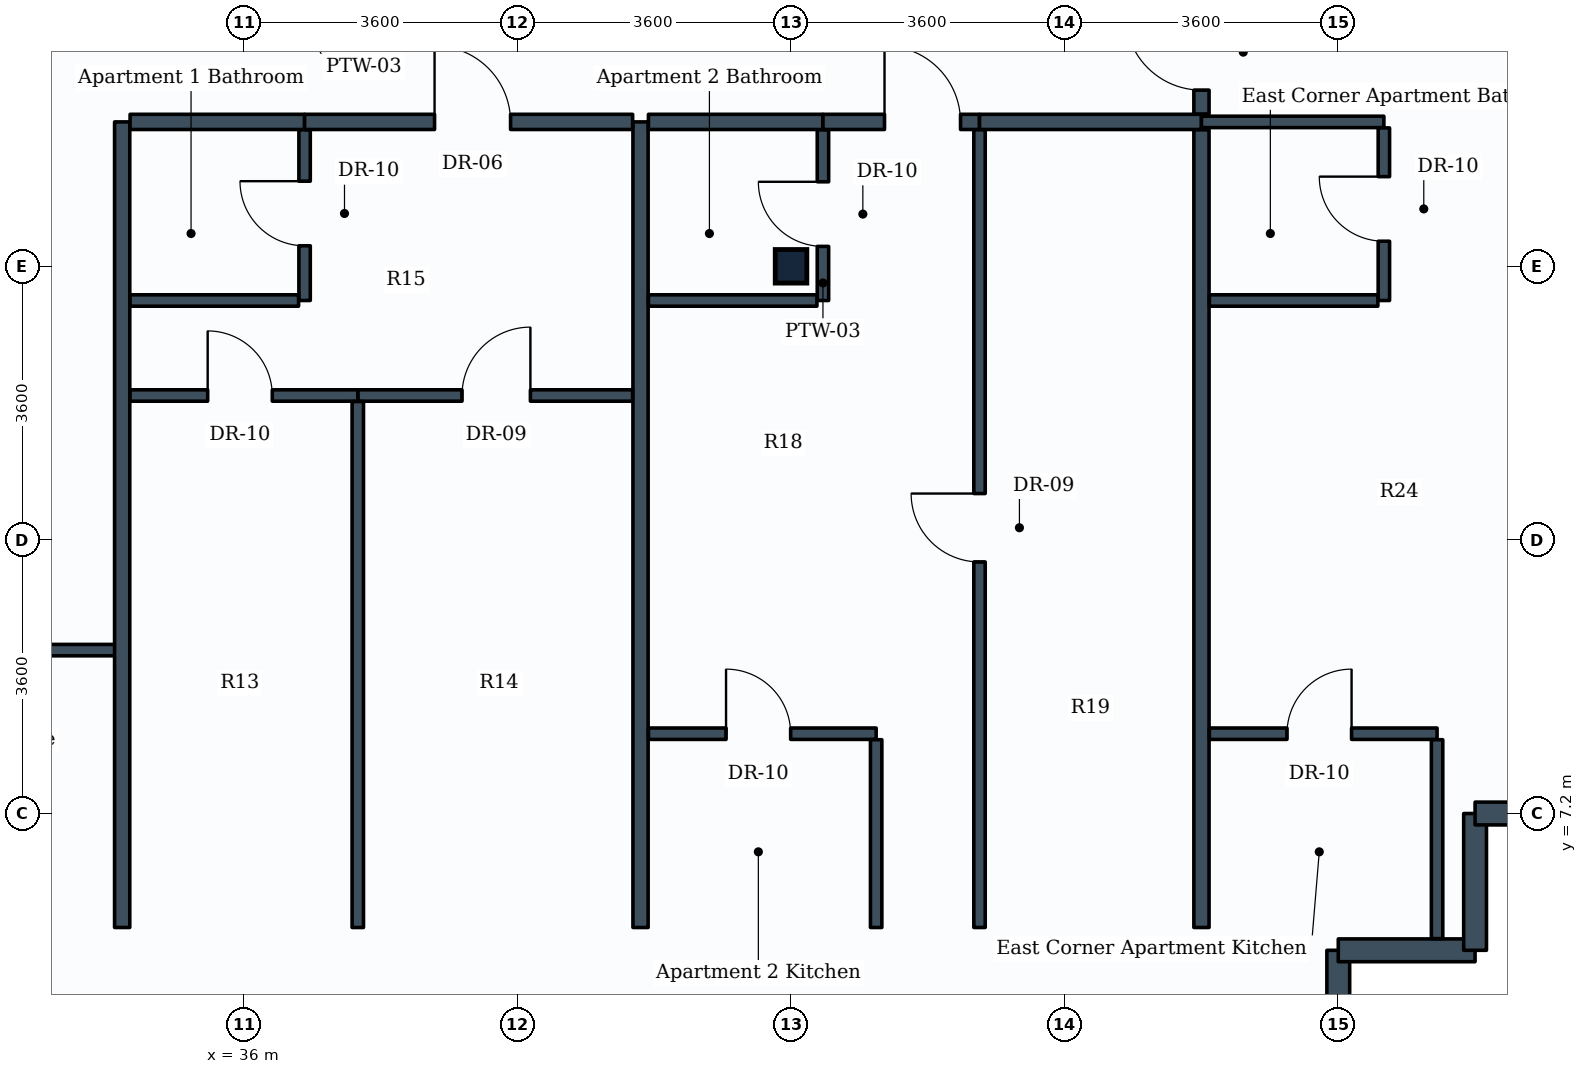
"""IFC4 building model, lengths in metres.
Left out: names, types, materials, properties, quantities, classifications, styles, units other than length and angle.
Written with IfcOpenShell. Run it as: python <this file> out.ifc"""

import sys

from ifc_helpers import new_model, si_unit, direction, frame, frame_2d, origin, origin_2d, place, context, subcontext, project, spatial, rectangle, i_section, extrude, element, fill, save


model = new_model("IFC4")
c1 = context("Model", 3, precision=1e-05, world=origin(), true_north=direction((0.0, 1.0)))
c2 = subcontext(c1, "Body", "Model", "MODEL_VIEW")
j1 = project(units=[si_unit("LENGTHUNIT", "METRE"), si_unit("PLANEANGLEUNIT", "RADIAN")], contexts=[c1])
p1 = place(None, origin())
s1 = spatial("IfcSite", under=j1, at=p1, CompositionType="ELEMENT")
p2 = place(p1, origin())
s2 = spatial("IfcBuilding", under=s1, at=p2, CompositionType="ELEMENT")
p3 = place(p2, frame((0.0, 0.0, 135.2)))
s3 = spatial("IfcBuildingStorey", under=s2, at=p3, CompositionType="ELEMENT", Elevation=135.2)
p4 = place(p3, frame((43.2, 14.4, 0.0), z_axis=(0.0, 0.0, 1.0), x_axis=(1.0, 0.0, 0.0)))
e1 = element("IfcColumn", 1, at=p4, inside=s3, PredefinedType="COLUMN", context=c2, shape_type="SweptSolid", body=[
    extrude(i_section(OverallWidth=0.416, OverallDepth=0.442, WebThickness=0.025, FlangeThickness=0.041, FilletRadius=0.015, at=origin_2d()), origin(), (0.0, 0.0, 1.0), 3.8),
])
p5 = place(p3, frame((50.4, 5.4, 0.0), z_axis=(0.0, 0.0, 1.0), x_axis=(0.0, -1.0, 0.0)))
e2 = element("IfcWall", 2, at=p5, inside=s3, PredefinedType="STANDARD", context=c2, shape_type="SweptSolid", body=[
    extrude(rectangle(XDim=1.8, YDim=0.3, at=frame_2d((0.9, 0.0))), origin(), (0.0, 0.0, 1.0), 2.93),
])
for number, where, z_axis, x_axis in (
    (3, (52.2, 5.4, 0.0), (0.0, 0.0, 1.0), (-1.0, 0.0, 0.0)),
    (4, (52.2, 7.2, 0.0), (0.0, 0.0, 1.0), (0.0, -1.0, 0.0)),
):
    element("IfcWall", number, at=place(p3, frame(where, z_axis=z_axis, x_axis=x_axis)), inside=s3, PredefinedType="STANDARD", context=c2, shape_type="SweptSolid", body=[
        extrude(rectangle(XDim=1.8, YDim=0.3, at=frame_2d((0.9, 0.0))), origin(), (0.0, 0.0, 1.0), 3.535),
    ])
p6 = place(p3, frame((54.0, 7.2, 0.0), z_axis=(0.0, 0.0, 1.0), x_axis=(-1.0, 0.0, 0.0)))
e5 = element("IfcWall", 5, at=p6, inside=s3, PredefinedType="STANDARD", context=c2, shape_type="SweptSolid", body=[
    extrude(rectangle(XDim=1.8, YDim=0.3, at=frame_2d((0.9, 0.0))), origin(), (0.0, 0.0, 1.0), 2.93),
])
p7 = place(p3, frame((28.879, 9.35, 0.0), z_axis=(0.0, 0.0, 1.0), x_axis=(1.0, 0.0, 0.0)))
e6 = element("IfcWall", 6, at=p7, inside=s3, PredefinedType="PARTITIONING", context=c2, shape_type="SweptSolid", body=[
    extrude(rectangle(XDim=5.521, YDim=0.15, at=frame_2d((2.76, 0.0))), origin(), (0.0, 0.0, 1.0), 3.535),
])
p8 = place(p7, frame((0.36, 0.0, 0.0)))
e7 = element("IfcOpeningElement", 7, at=p8, cuts=e6, PredefinedType="OPENING", context=c2, shape_type="SweptSolid", body=[
    extrude(rectangle(XDim=1.0, YDim=2.1, at=frame_2d((0.5, 1.05))), frame((0.0, 0.085, 0.0), z_axis=(0.0, -1.0, 0.0), x_axis=(1.0, 0.0, 0.0)), (0.0, 0.0, 1.0), 0.17),
])
p9 = place(p3, frame((34.4, 5.7, 0.0), z_axis=(0.0, 0.0, 1.0), x_axis=(0.0, 1.0, 0.0)))
e8 = element("IfcWall", 8, at=p9, inside=s3, PredefinedType="PARTITIONING", context=c2, shape_type="SweptSolid", body=[
    extrude(rectangle(XDim=10.6, YDim=0.2, at=frame_2d((5.3, 0.0))), origin(), (0.0, 0.0, 1.0), 3.17),
])
p10 = place(p3, frame((41.22, 5.7, 0.0), z_axis=(0.0, 0.0, 1.0), x_axis=(0.0, 1.0, 0.0)))
e9 = element("IfcWall", 9, at=p10, inside=s3, PredefinedType="PARTITIONING", context=c2, shape_type="SweptSolid", body=[
    extrude(rectangle(XDim=10.6, YDim=0.2, at=frame_2d((5.3, 0.0))), origin(), (0.0, 0.0, 1.0), 3.13),
])
p11 = place(p3, frame((34.504, 16.3, 0.0), z_axis=(0.0, 0.0, 1.0), x_axis=(1.0, 0.0, 0.0)))
e10 = element("IfcWall", 10, at=p11, inside=s3, PredefinedType="PARTITIONING", context=c2, shape_type="SweptSolid", body=[
    extrude(rectangle(XDim=2.296, YDim=0.2, at=frame_2d((1.148, 0.0))), origin(), (0.0, 0.0, 1.0), 3.22),
])
p12 = place(p3, frame((36.8, 13.95, 0.0), z_axis=(0.0, 0.0, 1.0), x_axis=(0.0, 1.0, 0.0)))
e11 = element("IfcWall", 11, at=p12, inside=s3, PredefinedType="PARTITIONING", context=c2, shape_type="SweptSolid", body=[
    extrude(rectangle(XDim=2.246, YDim=0.15, at=frame_2d((1.123, 0.0))), origin(), (0.0, 0.0, 1.0), 3.17),
])
p13 = place(p12, frame((0.72, 0.0, 0.0)))
e12 = element("IfcOpeningElement", 12, at=p13, cuts=e11, PredefinedType="OPENING", context=c2, shape_type="SweptSolid", body=[
    extrude(rectangle(XDim=0.85, YDim=2.1, at=frame_2d((0.425, 1.05))), frame((0.0, 0.085, 0.0), z_axis=(0.0, -1.0, 0.0), x_axis=(1.0, 0.0, 0.0)), (0.0, 0.0, 1.0), 0.17),
])
p14 = place(p3, frame((34.504, 13.95, 0.0), z_axis=(0.0, 0.0, 1.0), x_axis=(1.0, 0.0, 0.0)))
e13 = element("IfcWall", 13, at=p14, inside=s3, PredefinedType="PARTITIONING", context=c2, shape_type="SweptSolid", body=[
    extrude(rectangle(XDim=2.217, YDim=0.15, at=frame_2d((1.108, 0.0))), origin(), (0.0, 0.0, 1.0), 3.22),
])
p15 = place(p3, frame((36.8, 16.3, 0.0), z_axis=(0.0, 0.0, 1.0), x_axis=(1.0, 0.0, 0.0)))
e14 = element("IfcWall", 14, at=p15, inside=s3, PredefinedType="PARTITIONING", context=c2, shape_type="SweptSolid", body=[
    extrude(rectangle(XDim=4.316, YDim=0.2, at=frame_2d((2.158, 0.0))), origin(), (0.0, 0.0, 1.0), 3.17),
])
p16 = place(p15, frame((1.71, 0.0, 0.0)))
e15 = element("IfcOpeningElement", 15, at=p16, cuts=e14, PredefinedType="OPENING", context=c2, shape_type="SweptSolid", body=[
    extrude(rectangle(XDim=1.0, YDim=2.1, at=frame_2d((0.5, 1.05))), frame((0.0, 0.11, 0.0), z_axis=(0.0, -1.0, 0.0), x_axis=(1.0, 0.0, 0.0)), (0.0, 0.0, 1.0), 0.22),
])
p17 = place(p3, frame((37.5, 12.7, 0.0), z_axis=(0.0, 0.0, 1.0), x_axis=(1.0, 0.0, 0.0)))
e16 = element("IfcWall", 16, at=p17, inside=s3, PredefinedType="PARTITIONING", context=c2, shape_type="SweptSolid", body=[
    extrude(rectangle(XDim=3.616, YDim=0.15, at=frame_2d((1.808, 0.0))), origin(), (0.0, 0.0, 1.0), 3.17),
])
p18 = place(p17, frame((1.371, 0.0, 0.0)))
e17 = element("IfcOpeningElement", 17, at=p18, cuts=e16, PredefinedType="OPENING", context=c2, shape_type="SweptSolid", body=[
    extrude(rectangle(XDim=0.9, YDim=2.1, at=frame_2d((0.45, 1.05))), frame((0.0, 0.085, 0.0), z_axis=(0.0, -1.0, 0.0), x_axis=(1.0, 0.0, 0.0)), (0.0, 0.0, 1.0), 0.17),
])
p19 = place(p3, frame((34.504, 12.7, 0.0), z_axis=(0.0, 0.0, 1.0), x_axis=(1.0, 0.0, 0.0)))
e18 = element("IfcWall", 18, at=p19, inside=s3, PredefinedType="PARTITIONING", context=c2, shape_type="SweptSolid", body=[
    extrude(rectangle(XDim=2.996, YDim=0.15, at=frame_2d((1.498, 0.0))), origin(), (0.0, 0.0, 1.0), 3.22),
])
p20 = place(p19, frame((1.021, 0.0, 0.0)))
e19 = element("IfcOpeningElement", 19, at=p20, cuts=e18, PredefinedType="OPENING", context=c2, shape_type="SweptSolid", body=[
    extrude(rectangle(XDim=0.85, YDim=2.1, at=frame_2d((0.425, 1.05))), frame((0.0, 0.085, 0.0), z_axis=(0.0, -1.0, 0.0), x_axis=(1.0, 0.0, 0.0)), (0.0, 0.0, 1.0), 0.17),
])
p21 = place(p3, frame((37.5, 5.7, 0.0), z_axis=(0.0, 0.0, 1.0), x_axis=(0.0, 1.0, 0.0)))
e20 = element("IfcWall", 20, at=p21, inside=s3, PredefinedType="PARTITIONING", context=c2, shape_type="SweptSolid", body=[
    extrude(rectangle(XDim=6.921, YDim=0.15, at=frame_2d((3.46, 0.0))), origin(), (0.0, 0.0, 1.0), 3.08),
])
p22 = place(p3, frame((41.324, 16.3, 0.0), z_axis=(0.0, 0.0, 1.0), x_axis=(1.0, 0.0, 0.0)))
e21 = element("IfcWall", 21, at=p22, inside=s3, PredefinedType="PARTITIONING", context=c2, shape_type="SweptSolid", body=[
    extrude(rectangle(XDim=2.296, YDim=0.2, at=frame_2d((1.148, 0.0))), origin(), (0.0, 0.0, 1.0), 3.18),
])
p23 = place(p3, frame((43.62, 13.95, 0.0), z_axis=(0.0, 0.0, 1.0), x_axis=(0.0, 1.0, 0.0)))
e22 = element("IfcWall", 22, at=p23, inside=s3, PredefinedType="PARTITIONING", context=c2, shape_type="SweptSolid", body=[
    extrude(rectangle(XDim=2.246, YDim=0.15, at=frame_2d((1.123, 0.0))), origin(), (0.0, 0.0, 1.0), 3.17),
])
p24 = place(p23, frame((0.712, 0.0, 0.0)))
e23 = element("IfcOpeningElement", 23, at=p24, cuts=e22, PredefinedType="OPENING", context=c2, shape_type="SweptSolid", body=[
    extrude(rectangle(XDim=0.85, YDim=2.1, at=frame_2d((0.425, 1.05))), frame((0.0, 0.085, 0.0), z_axis=(0.0, -1.0, 0.0), x_axis=(1.0, 0.0, 0.0)), (0.0, 0.0, 1.0), 0.17),
])
p25 = place(p3, frame((41.324, 13.95, 0.0), z_axis=(0.0, 0.0, 1.0), x_axis=(1.0, 0.0, 0.0)))
e24 = element("IfcWall", 24, at=p25, inside=s3, PredefinedType="PARTITIONING", context=c2, shape_type="SweptSolid", body=[
    extrude(rectangle(XDim=2.217, YDim=0.15, at=frame_2d((1.108, 0.0))), origin(), (0.0, 0.0, 1.0), 3.18),
])
p26 = place(p3, frame((43.62, 16.3, 0.0), z_axis=(0.0, 0.0, 1.0), x_axis=(1.0, 0.0, 0.0)))
e25 = element("IfcWall", 25, at=p26, inside=s3, PredefinedType="PARTITIONING", context=c2, shape_type="SweptSolid", body=[
    extrude(rectangle(XDim=2.06, YDim=0.2, at=frame_2d((1.03, 0.0))), origin(), (0.0, 0.0, 1.0), 3.535),
])
p27 = place(p26, frame((0.81, 0.0, 0.0)))
e26 = element("IfcOpeningElement", 26, at=p27, cuts=e25, PredefinedType="OPENING", context=c2, shape_type="SweptSolid", body=[
    extrude(rectangle(XDim=1.0, YDim=2.1, at=frame_2d((0.5, 1.05))), frame((0.0, 0.11, 0.0), z_axis=(0.0, -1.0, 0.0), x_axis=(1.0, 0.0, 0.0)), (0.0, 0.0, 1.0), 0.22),
])
p28 = place(p3, frame((45.68, 16.3, 0.0), z_axis=(0.0, 0.0, 1.0), x_axis=(1.0, 0.0, 0.0)))
e27 = element("IfcWall", 27, at=p28, inside=s3, PredefinedType="PARTITIONING", context=c2, shape_type="SweptSolid", body=[
    extrude(rectangle(XDim=2.92, YDim=0.2, at=frame_2d((1.46, 0.0))), origin(), (0.0, 0.0, 1.0), 3.17),
])
p29 = place(p3, frame((45.68, 5.7, 0.0), z_axis=(0.0, 0.0, 1.0), x_axis=(0.0, 1.0, 0.0)))
e28 = element("IfcWall", 28, at=p29, inside=s3, PredefinedType="PARTITIONING", context=c2, shape_type="SweptSolid", body=[
    extrude(rectangle(XDim=10.496, YDim=0.15, at=frame_2d((5.248, 0.0))), origin(), (0.0, 0.0, 1.0), 3.17),
])
p30 = place(p29, frame((4.81, 0.0, 0.0)))
e29 = element("IfcOpeningElement", 29, at=p30, cuts=e28, PredefinedType="OPENING", context=c2, shape_type="SweptSolid", body=[
    extrude(rectangle(XDim=0.9, YDim=2.1, at=frame_2d((0.45, 1.05))), frame((0.0, 0.085, 0.0), z_axis=(0.0, -1.0, 0.0), x_axis=(1.0, 0.0, 0.0)), (0.0, 0.0, 1.0), 0.17),
])
p31 = place(p3, frame((41.324, 8.25, 0.0), z_axis=(0.0, 0.0, 1.0), x_axis=(1.0, 0.0, 0.0)))
e30 = element("IfcWall", 30, at=p31, inside=s3, PredefinedType="PARTITIONING", context=c2, shape_type="SweptSolid", body=[
    extrude(rectangle(XDim=2.996, YDim=0.15, at=frame_2d((1.498, 0.0))), origin(), (0.0, 0.0, 1.0), 3.18),
])
p32 = place(p31, frame((1.021, 0.0, 0.0)))
e31 = element("IfcOpeningElement", 31, at=p32, cuts=e30, PredefinedType="OPENING", context=c2, shape_type="SweptSolid", body=[
    extrude(rectangle(XDim=0.85, YDim=2.1, at=frame_2d((0.425, 1.05))), frame((0.0, 0.085, 0.0), z_axis=(0.0, -1.0, 0.0), x_axis=(1.0, 0.0, 0.0)), (0.0, 0.0, 1.0), 0.17),
])
p33 = place(p3, frame((44.32, 5.7, 0.0), z_axis=(0.0, 0.0, 1.0), x_axis=(0.0, 1.0, 0.0)))
e32 = element("IfcWall", 32, at=p33, inside=s3, PredefinedType="PARTITIONING", context=c2, shape_type="SweptSolid", body=[
    extrude(rectangle(XDim=2.471, YDim=0.15, at=frame_2d((1.235, 0.0))), origin(), (0.0, 0.0, 1.0), 3.17),
])
p34 = place(p3, frame((48.6, 5.7, 0.0), z_axis=(0.0, 0.0, 1.0), x_axis=(0.0, 1.0, 0.0)))
e33 = element("IfcWall", 33, at=p34, inside=s3, PredefinedType="PARTITIONING", context=c2, shape_type="SweptSolid", body=[
    extrude(rectangle(XDim=10.496, YDim=0.2, at=frame_2d((5.248, 0.0))), origin(), (0.0, 0.0, 1.0), 3.17),
])
p35 = place(p3, frame((48.6, 16.404, 0.0), z_axis=(0.0, 0.0, 1.0), x_axis=(0.0, 1.0, 0.0)))
e34 = element("IfcWall", 34, at=p35, inside=s3, PredefinedType="PARTITIONING", context=c2, shape_type="SweptSolid", body=[
    extrude(rectangle(XDim=1.667, YDim=0.2, at=frame_2d((0.833, 0.0))), origin(), (0.0, 0.0, 1.0), 3.535),
])
p36 = place(p35, frame((0.314, 0.0, 0.0)))
e35 = element("IfcOpeningElement", 35, at=p36, cuts=e34, PredefinedType="OPENING", context=c2, shape_type="SweptSolid", body=[
    extrude(rectangle(XDim=1.0, YDim=2.1, at=frame_2d((0.5, 1.05))), frame((0.0, 0.11, 0.0), z_axis=(0.0, -1.0, 0.0), x_axis=(1.0, 0.0, 0.0)), (0.0, 0.0, 1.0), 0.22),
])
p37 = place(p3, frame((48.6, 16.3, 0.0), z_axis=(0.0, 0.0, 1.0), x_axis=(1.0, 0.0, 0.0)))
e36 = element("IfcWall", 36, at=p37, inside=s3, PredefinedType="PARTITIONING", context=c2, shape_type="SweptSolid", body=[
    extrude(rectangle(XDim=2.4, YDim=0.15, at=frame_2d((1.2, 0.0))), origin(), (0.0, 0.0, 1.0), 3.535),
])
p38 = place(p3, frame((51.0, 13.95, 0.0), z_axis=(0.0, 0.0, 1.0), x_axis=(0.0, 1.0, 0.0)))
e37 = element("IfcWall", 37, at=p38, inside=s3, PredefinedType="PARTITIONING", context=c2, shape_type="SweptSolid", body=[
    extrude(rectangle(XDim=2.271, YDim=0.15, at=frame_2d((1.135, 0.0))), origin(), (0.0, 0.0, 1.0), 3.17),
])
p39 = place(p38, frame((0.78, 0.0, 0.0)))
e38 = element("IfcOpeningElement", 38, at=p39, cuts=e37, PredefinedType="OPENING", context=c2, shape_type="SweptSolid", body=[
    extrude(rectangle(XDim=0.85, YDim=2.1, at=frame_2d((0.425, 1.05))), frame((0.0, 0.085, 0.0), z_axis=(0.0, -1.0, 0.0), x_axis=(1.0, 0.0, 0.0)), (0.0, 0.0, 1.0), 0.17),
])
p40 = place(p3, frame((48.704, 13.95, 0.0), z_axis=(0.0, 0.0, 1.0), x_axis=(1.0, 0.0, 0.0)))
e39 = element("IfcWall", 39, at=p40, inside=s3, PredefinedType="PARTITIONING", context=c2, shape_type="SweptSolid", body=[
    extrude(rectangle(XDim=2.217, YDim=0.15, at=frame_2d((1.108, 0.0))), origin(), (0.0, 0.0, 1.0), 3.535),
])
p41 = place(p3, frame((48.704, 8.25, 0.0), z_axis=(0.0, 0.0, 1.0), x_axis=(1.0, 0.0, 0.0)))
e40 = element("IfcWall", 40, at=p41, inside=s3, PredefinedType="PARTITIONING", context=c2, shape_type="SweptSolid", body=[
    extrude(rectangle(XDim=2.996, YDim=0.15, at=frame_2d((1.498, 0.0))), origin(), (0.0, 0.0, 1.0), 3.535),
])
p42 = place(p41, frame((1.021, 0.0, 0.0)))
e41 = element("IfcOpeningElement", 41, at=p42, cuts=e40, PredefinedType="OPENING", context=c2, shape_type="SweptSolid", body=[
    extrude(rectangle(XDim=0.85, YDim=2.1, at=frame_2d((0.425, 1.05))), frame((0.0, 0.085, 0.0), z_axis=(0.0, -1.0, 0.0), x_axis=(1.0, 0.0, 0.0)), (0.0, 0.0, 1.0), 0.17),
])
p43 = place(p3, frame((51.7, 5.554, 0.0), z_axis=(0.0, 0.0, 1.0), x_axis=(0.0, 1.0, 0.0)))
e42 = element("IfcWall", 42, at=p43, inside=s3, PredefinedType="PARTITIONING", context=c2, shape_type="SweptSolid", body=[
    extrude(rectangle(XDim=2.617, YDim=0.15, at=frame_2d((1.309, 0.0))), origin(), (0.0, 0.0, 1.0), 3.535),
])
p44 = place(p13, origin())
e43 = element("IfcDoor", 43, at=p44, inside=s3, OperationType="SINGLE_SWING_RIGHT", PredefinedType="DOOR", context=c2, shape_type="SweptSolid", body=[
    extrude(rectangle(XDim=0.85, YDim=2.1, at=frame_2d((0.425, 1.05))), frame((0.0, 0.025, 0.0), z_axis=(0.0, -1.0, 0.0), x_axis=(1.0, 0.0, 0.0)), (0.0, 0.0, 1.0), 0.05),
])
fill(e12, e43)
p45 = place(p16, origin())
e44 = element("IfcDoor", 44, at=p45, inside=s3, OperationType="SINGLE_SWING_LEFT", PredefinedType="DOOR", context=c2, shape_type="SweptSolid", body=[
    extrude(rectangle(XDim=1.0, YDim=2.1, at=frame_2d((0.5, 1.05))), frame((0.0, 0.025, 0.0), z_axis=(0.0, -1.0, 0.0), x_axis=(1.0, 0.0, 0.0)), (0.0, 0.0, 1.0), 0.05),
])
fill(e15, e44)
p46 = place(p18, origin())
e45 = element("IfcDoor", 45, at=p46, inside=s3, OperationType="SINGLE_SWING_RIGHT", PredefinedType="DOOR", context=c2, shape_type="SweptSolid", body=[
    extrude(rectangle(XDim=0.9, YDim=2.1, at=frame_2d((0.45, 1.05))), frame((0.0, 0.025, 0.0), z_axis=(0.0, -1.0, 0.0), x_axis=(1.0, 0.0, 0.0)), (0.0, 0.0, 1.0), 0.05),
])
fill(e17, e45)
p47 = place(p20, origin())
e46 = element("IfcDoor", 46, at=p47, inside=s3, OperationType="SINGLE_SWING_LEFT", PredefinedType="DOOR", context=c2, shape_type="SweptSolid", body=[
    extrude(rectangle(XDim=0.85, YDim=2.1, at=frame_2d((0.425, 1.05))), frame((0.0, 0.025, 0.0), z_axis=(0.0, -1.0, 0.0), x_axis=(1.0, 0.0, 0.0)), (0.0, 0.0, 1.0), 0.05),
])
fill(e19, e46)
p48 = place(p24, origin())
e47 = element("IfcDoor", 47, at=p48, inside=s3, OperationType="SINGLE_SWING_RIGHT", PredefinedType="DOOR", context=c2, shape_type="SweptSolid", body=[
    extrude(rectangle(XDim=0.85, YDim=2.1, at=frame_2d((0.425, 1.05))), frame((0.0, 0.025, 0.0), z_axis=(0.0, -1.0, 0.0), x_axis=(1.0, 0.0, 0.0)), (0.0, 0.0, 1.0), 0.05),
])
fill(e23, e47)
p49 = place(p27, origin())
e48 = element("IfcDoor", 48, at=p49, inside=s3, OperationType="SINGLE_SWING_LEFT", PredefinedType="DOOR", context=c2, shape_type="SweptSolid", body=[
    extrude(rectangle(XDim=1.0, YDim=2.1, at=frame_2d((0.5, 1.05))), frame((0.0, 0.025, 0.0), z_axis=(0.0, -1.0, 0.0), x_axis=(1.0, 0.0, 0.0)), (0.0, 0.0, 1.0), 0.05),
])
fill(e26, e48)
p50 = place(p30, origin())
e49 = element("IfcDoor", 49, at=p50, inside=s3, OperationType="SINGLE_SWING_RIGHT", PredefinedType="DOOR", context=c2, shape_type="SweptSolid", body=[
    extrude(rectangle(XDim=0.9, YDim=2.1, at=frame_2d((0.45, 1.05))), frame((0.0, 0.025, 0.0), z_axis=(0.0, -1.0, 0.0), x_axis=(1.0, 0.0, 0.0)), (0.0, 0.0, 1.0), 0.05),
])
fill(e29, e49)
p51 = place(p32, origin())
e50 = element("IfcDoor", 50, at=p51, inside=s3, OperationType="SINGLE_SWING_LEFT", PredefinedType="DOOR", context=c2, shape_type="SweptSolid", body=[
    extrude(rectangle(XDim=0.85, YDim=2.1, at=frame_2d((0.425, 1.05))), frame((0.0, 0.025, 0.0), z_axis=(0.0, -1.0, 0.0), x_axis=(1.0, 0.0, 0.0)), (0.0, 0.0, 1.0), 0.05),
])
fill(e31, e50)
p52 = place(p36, origin())
e51 = element("IfcDoor", 51, at=p52, inside=s3, OperationType="SINGLE_SWING_RIGHT", PredefinedType="DOOR", context=c2, shape_type="SweptSolid", body=[
    extrude(rectangle(XDim=1.0, YDim=2.1, at=frame_2d((0.5, 1.05))), frame((0.0, 0.025, 0.0), z_axis=(0.0, -1.0, 0.0), x_axis=(1.0, 0.0, 0.0)), (0.0, 0.0, 1.0), 0.05),
])
fill(e35, e51)
p53 = place(p39, origin())
e52 = element("IfcDoor", 52, at=p53, inside=s3, OperationType="SINGLE_SWING_RIGHT", PredefinedType="DOOR", context=c2, shape_type="SweptSolid", body=[
    extrude(rectangle(XDim=0.85, YDim=2.1, at=frame_2d((0.425, 1.05))), frame((0.0, 0.025, 0.0), z_axis=(0.0, -1.0, 0.0), x_axis=(1.0, 0.0, 0.0)), (0.0, 0.0, 1.0), 0.05),
])
fill(e38, e52)
p54 = place(p42, origin())
e53 = element("IfcDoor", 53, at=p54, inside=s3, OperationType="SINGLE_SWING_RIGHT", PredefinedType="DOOR", context=c2, shape_type="SweptSolid", body=[
    extrude(rectangle(XDim=0.85, YDim=2.1, at=frame_2d((0.425, 1.05))), frame((0.0, 0.025, 0.0), z_axis=(0.0, -1.0, 0.0), x_axis=(1.0, 0.0, 0.0)), (0.0, 0.0, 1.0), 0.05),
])
fill(e41, e53)
save(model, sys.argv[1])
